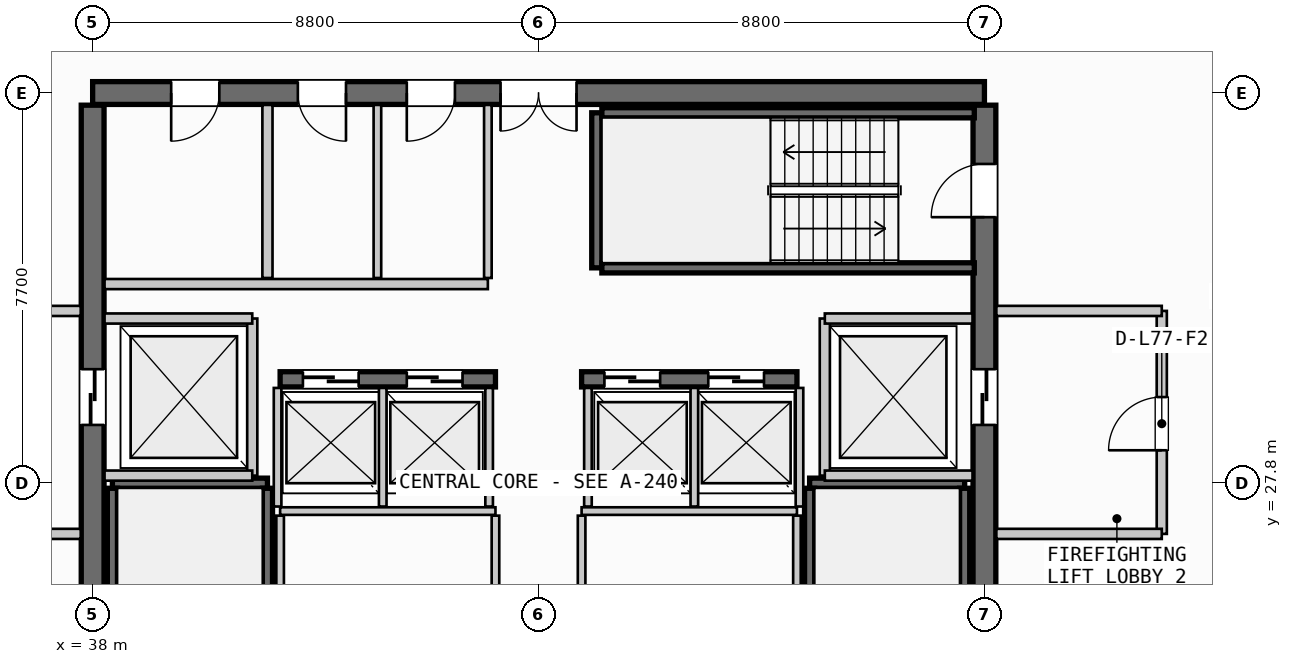
"""IFC4 building model, lengths in metres.
Left out: names, types, materials, properties, quantities, classifications, styles, units other than length and angle.
Written with IfcOpenShell. Run it as: python <this file> out.ifc"""

import sys

from ifc_helpers import new_model, si_unit, direction, frame, frame_2d, origin, place, context, subcontext, project, spatial, rectangle, extrude, source, transform, mapped, element, fill, save


model = new_model("IFC4")
c1 = context("Model", 3, precision=1e-05, world=origin(), true_north=direction((0.0, 1.0)))
c2 = subcontext(c1, "Body", "Model", "MODEL_VIEW")
j1 = project(units=[si_unit("LENGTHUNIT", "METRE"), si_unit("PLANEANGLEUNIT", "RADIAN")], contexts=[c1])
p1 = place(None, origin())
s1 = spatial("IfcSite", under=j1, at=p1, CompositionType="ELEMENT")
p2 = place(p1, origin())
s2 = spatial("IfcBuilding", under=s1, at=p2, CompositionType="ELEMENT")
p3 = place(p2, frame((0.0, 0.0, 290.5)))
s3 = spatial("IfcBuildingStorey", under=s2, at=p3, CompositionType="ELEMENT", Elevation=290.5)
p4 = place(p3, frame((55.6, 35.5, 0.0), z_axis=(0.0, 0.0, 1.0), x_axis=(-1.0, 0.0, 0.0)))
e1 = element("IfcWall", 1, at=p4, inside=s3, PredefinedType="SHEAR", context=c2, shape_type="SweptSolid", body=[
    extrude(rectangle(XDim=17.6, YDim=0.45, at=frame_2d((8.8, 0.0))), origin(), (0.0, 0.0, 1.0), 3.21),
])
p5 = place(p4, frame((8.05, 0.0, 0.0)))
e2 = element("IfcOpeningElement", 2, at=p5, cuts=e1, PredefinedType="OPENING", context=c2, shape_type="SweptSolid", body=[
    extrude(rectangle(XDim=1.5, YDim=2.2, at=frame_2d((0.75, 1.1))), frame((0.0, 0.235, 0.0), z_axis=(0.0, -1.0, 0.0), x_axis=(1.0, 0.0, 0.0)), (0.0, 0.0, 1.0), 0.47),
])
p6 = place(p4, frame((15.1, 0.0, 0.0)))
e3 = element("IfcOpeningElement", 3, at=p6, cuts=e1, PredefinedType="OPENING", context=c2, shape_type="SweptSolid", body=[
    extrude(rectangle(XDim=0.95, YDim=2.15, at=frame_2d((0.475, 1.075))), frame((0.0, 0.235, 0.0), z_axis=(0.0, -1.0, 0.0), x_axis=(1.0, 0.0, 0.0)), (0.0, 0.0, 1.0), 0.47),
])
p7 = place(p4, frame((12.6, 0.0, 0.0)))
e4 = element("IfcOpeningElement", 4, at=p7, cuts=e1, PredefinedType="OPENING", context=c2, shape_type="SweptSolid", body=[
    extrude(rectangle(XDim=0.95, YDim=2.15, at=frame_2d((0.475, 1.075))), frame((0.0, 0.235, 0.0), z_axis=(0.0, -1.0, 0.0), x_axis=(1.0, 0.0, 0.0)), (0.0, 0.0, 1.0), 0.47),
])
p8 = place(p4, frame((10.45, 0.0, 0.0)))
e5 = element("IfcOpeningElement", 5, at=p8, cuts=e1, PredefinedType="OPENING", context=c2, shape_type="SweptSolid", body=[
    extrude(rectangle(XDim=0.95, YDim=2.15, at=frame_2d((0.475, 1.075))), frame((0.0, 0.235, 0.0), z_axis=(0.0, -1.0, 0.0), x_axis=(1.0, 0.0, 0.0)), (0.0, 0.0, 1.0), 0.47),
])
p9 = place(p3, frame((38.0, 35.26, 0.0), z_axis=(0.0, 0.0, 1.0), x_axis=(0.0, -1.0, 0.0)))
e6 = element("IfcWall", 6, at=p9, inside=s3, PredefinedType="SHEAR", context=c2, shape_type="SweptSolid", body=[
    extrude(rectangle(XDim=14.92, YDim=0.45, at=frame_2d((7.46, 0.0))), origin(), (0.0, 0.0, 1.0), 3.21),
])
p10 = place(p9, frame((5.21, 0.0, 0.0)))
e7 = element("IfcOpeningElement", 7, at=p10, cuts=e6, PredefinedType="OPENING", context=c2, shape_type="SweptSolid", body=[
    extrude(rectangle(XDim=1.1, YDim=2.2, at=frame_2d((0.55, 1.1))), frame((0.0, 0.235, 0.0), z_axis=(0.0, -1.0, 0.0), x_axis=(1.0, 0.0, 0.0)), (0.0, 0.0, 1.0), 0.47),
])
p11 = place(p3, frame((55.6, 20.34, 0.0), z_axis=(0.0, 0.0, 1.0), x_axis=(0.0, 1.0, 0.0)))
e8 = element("IfcWall", 8, at=p11, inside=s3, PredefinedType="SHEAR", context=c2, shape_type="SweptSolid", body=[
    extrude(rectangle(XDim=14.92, YDim=0.45, at=frame_2d((7.46, 0.0))), origin(), (0.0, 0.0, 1.0), 3.21),
])
p12 = place(p11, frame((12.71, 0.0, 0.0)))
e9 = element("IfcOpeningElement", 9, at=p12, cuts=e8, PredefinedType="OPENING", context=c2, shape_type="SweptSolid", body=[
    extrude(rectangle(XDim=1.05, YDim=2.15, at=frame_2d((0.525, 1.075))), frame((0.0, 0.235, 0.0), z_axis=(0.0, -1.0, 0.0), x_axis=(1.0, 0.0, 0.0)), (0.0, 0.0, 1.0), 0.47),
])
p13 = place(p11, frame((8.61, 0.0, 0.0)))
e10 = element("IfcOpeningElement", 10, at=p13, cuts=e8, PredefinedType="OPENING", context=c2, shape_type="SweptSolid", body=[
    extrude(rectangle(XDim=1.1, YDim=2.2, at=frame_2d((0.55, 1.1))), frame((0.0, 0.235, 0.0), z_axis=(0.0, -1.0, 0.0), x_axis=(1.0, 0.0, 0.0)), (0.0, 0.0, 1.0), 0.47),
])
p14 = place(p3, frame((41.7, 29.85, 0.0), z_axis=(0.0, 0.0, 1.0), x_axis=(1.0, 0.0, 0.0)))
e11 = element("IfcWall", 11, at=p14, inside=s3, PredefinedType="SHEAR", context=c2, shape_type="SweptSolid", body=[
    extrude(rectangle(XDim=4.25, YDim=0.3, at=frame_2d((2.125, 0.0))), origin(), (0.0, 0.0, 1.0), 3.21),
])
p15 = place(p14, frame((0.45, 0.0, 0.0)))
e12 = element("IfcOpeningElement", 12, at=p15, cuts=e11, PredefinedType="OPENING", context=c2, shape_type="SweptSolid", body=[
    extrude(rectangle(XDim=1.1, YDim=2.2, at=frame_2d((0.55, 1.1))), frame((0.0, 0.16, 0.0), z_axis=(0.0, -1.0, 0.0), x_axis=(1.0, 0.0, 0.0)), (0.0, 0.0, 1.0), 0.32),
])
p16 = place(p14, frame((2.5, 0.0, 0.0)))
e13 = element("IfcOpeningElement", 13, at=p16, cuts=e11, PredefinedType="OPENING", context=c2, shape_type="SweptSolid", body=[
    extrude(rectangle(XDim=1.1, YDim=2.2, at=frame_2d((0.55, 1.1))), frame((0.0, 0.16, 0.0), z_axis=(0.0, -1.0, 0.0), x_axis=(1.0, 0.0, 0.0)), (0.0, 0.0, 1.0), 0.32),
])
p17 = place(p3, frame((47.65, 29.85, 0.0), z_axis=(0.0, 0.0, 1.0), x_axis=(1.0, 0.0, 0.0)))
e14 = element("IfcWall", 14, at=p17, inside=s3, PredefinedType="SHEAR", context=c2, shape_type="SweptSolid", body=[
    extrude(rectangle(XDim=4.25, YDim=0.3, at=frame_2d((2.125, 0.0))), origin(), (0.0, 0.0, 1.0), 3.21),
])
p18 = place(p17, frame((0.45, 0.0, 0.0)))
e15 = element("IfcOpeningElement", 15, at=p18, cuts=e14, PredefinedType="OPENING", context=c2, shape_type="SweptSolid", body=[
    extrude(rectangle(XDim=1.1, YDim=2.2, at=frame_2d((0.55, 1.1))), frame((0.0, 0.16, 0.0), z_axis=(0.0, -1.0, 0.0), x_axis=(1.0, 0.0, 0.0)), (0.0, 0.0, 1.0), 0.32),
])
p19 = place(p17, frame((2.5, 0.0, 0.0)))
e16 = element("IfcOpeningElement", 16, at=p19, cuts=e14, PredefinedType="OPENING", context=c2, shape_type="SweptSolid", body=[
    extrude(rectangle(XDim=1.1, YDim=2.2, at=frame_2d((0.55, 1.1))), frame((0.0, 0.16, 0.0), z_axis=(0.0, -1.0, 0.0), x_axis=(1.0, 0.0, 0.0)), (0.0, 0.0, 1.0), 0.32),
])
p20 = place(p3, frame((38.39, 27.8, 0.0), z_axis=(0.0, 0.0, 1.0), x_axis=(1.0, 0.0, 0.0)))
e17 = element("IfcWall", 17, at=p20, inside=s3, PredefinedType="SHEAR", context=c2, shape_type="SweptSolid", body=[
    extrude(rectangle(XDim=3.06, YDim=0.2, at=frame_2d((1.53, 0.0))), origin(), (0.0, 0.0, 1.0), 3.21),
])
for number, where, z_axis, x_axis in (
    (18, (41.45, 27.7, 0.0), (0.0, 0.0, 1.0), (0.0, -1.0, 0.0)),
    (19, (38.39, 20.35, 0.0), (0.0, 0.0, 1.0), (0.0, 1.0, 0.0)),
):
    element("IfcWall", number, at=place(p3, frame(where, z_axis=z_axis, x_axis=x_axis)), inside=s3, PredefinedType="SHEAR", context=c2, shape_type="SweptSolid", body=[
        extrude(rectangle(XDim=7.35, YDim=0.2, at=frame_2d((3.675, 0.0))), origin(), (0.0, 0.0, 1.0), 3.21),
    ])
p21 = place(p3, frame((52.15, 27.8, 0.0), z_axis=(0.0, 0.0, 1.0), x_axis=(1.0, 0.0, 0.0)))
e20 = element("IfcWall", 20, at=p21, inside=s3, PredefinedType="SHEAR", context=c2, shape_type="SweptSolid", body=[
    extrude(rectangle(XDim=3.06, YDim=0.2, at=frame_2d((1.53, 0.0))), origin(), (0.0, 0.0, 1.0), 3.21),
])
for number, where, z_axis, x_axis in (
    (21, (55.21, 27.7, 0.0), (0.0, 0.0, 1.0), (0.0, -1.0, 0.0)),
    (22, (52.15, 20.35, 0.0), (0.0, 0.0, 1.0), (0.0, 1.0, 0.0)),
):
    element("IfcWall", number, at=place(p3, frame(where, z_axis=z_axis, x_axis=x_axis)), inside=s3, PredefinedType="SHEAR", context=c2, shape_type="SweptSolid", body=[
        extrude(rectangle(XDim=7.35, YDim=0.2, at=frame_2d((3.675, 0.0))), origin(), (0.0, 0.0, 1.0), 3.21),
    ])
p22 = place(p3, frame((47.95, 32.05, 0.0), z_axis=(0.0, 0.0, 1.0), x_axis=(0.0, 1.0, 0.0)))
e23 = element("IfcWall", 23, at=p22, inside=s3, PredefinedType="SHEAR", context=c2, shape_type="SweptSolid", body=[
    extrude(rectangle(XDim=3.06, YDim=0.2, at=frame_2d((1.53, 0.0))), origin(), (0.0, 0.0, 1.0), 3.21),
])
for number, where, z_axis, x_axis in (
    (24, (48.05, 35.11, 0.0), (0.0, 0.0, 1.0), (1.0, 0.0, 0.0)),
    (25, (55.4, 32.05, 0.0), (0.0, 0.0, 1.0), (-1.0, 0.0, 0.0)),
):
    element("IfcWall", number, at=place(p3, frame(where, z_axis=z_axis, x_axis=x_axis)), inside=s3, PredefinedType="SHEAR", context=c2, shape_type="SweptSolid", body=[
        extrude(rectangle(XDim=7.35, YDim=0.2, at=frame_2d((3.675, 0.0))), origin(), (0.0, 0.0, 1.0), 3.21),
    ])
p23 = place(p3, frame((41.15, 27.95, 0.0), z_axis=(0.0, 0.0, 1.0), x_axis=(0.0, 1.0, 0.0)))
e26 = element("IfcWall", 26, at=p23, inside=s3, PredefinedType="PARTITIONING", context=c2, shape_type="SweptSolid", body=[
    extrude(rectangle(XDim=3.1, YDim=0.2, at=frame_2d((1.55, 0.0))), origin(), (0.0, 0.0, 1.0), 2.315),
])
for number, where, z_axis, x_axis in (
    (27, (38.235, 27.95, 0.0), (0.0, 0.0, 1.0), (1.0, 0.0, 0.0)),
    (28, (38.235, 31.05, 0.0), (0.0, 0.0, 1.0), (1.0, 0.0, 0.0)),
):
    element("IfcWall", number, at=place(p3, frame(where, z_axis=z_axis, x_axis=x_axis)), inside=s3, PredefinedType="PARTITIONING", context=c2, shape_type="SweptSolid", body=[
        extrude(rectangle(XDim=2.915, YDim=0.2, at=frame_2d((1.458, 0.0))), origin(), (0.0, 0.0, 1.0), 2.315),
    ])
for number, where, z_axis, x_axis in (
    (29, (34.5, 26.8, 0.0), (0.0, 0.0, 1.0), (1.0, 0.0, 0.0)),
    (30, (34.5, 31.2, 0.0), (0.0, 0.0, 1.0), (1.0, 0.0, 0.0)),
):
    element("IfcWall", number, at=place(p3, frame(where, z_axis=z_axis, x_axis=x_axis)), inside=s3, PredefinedType="PARTITIONING", context=c2, shape_type="SweptSolid", body=[
        extrude(rectangle(XDim=3.265, YDim=0.2, at=frame_2d((1.632, 0.0))), origin(), (0.0, 0.0, 1.0), 2.315),
    ])
p24 = place(p3, frame((52.45, 27.95, 0.0), z_axis=(0.0, 0.0, 1.0), x_axis=(0.0, 1.0, 0.0)))
e31 = element("IfcWall", 31, at=p24, inside=s3, PredefinedType="PARTITIONING", context=c2, shape_type="SweptSolid", body=[
    extrude(rectangle(XDim=3.1, YDim=0.2, at=frame_2d((1.55, 0.0))), origin(), (0.0, 0.0, 1.0), 2.315),
])
for number, where, z_axis, x_axis in (
    (32, (52.45, 27.95, 0.0), (0.0, 0.0, 1.0), (1.0, 0.0, 0.0)),
    (33, (52.45, 31.05, 0.0), (0.0, 0.0, 1.0), (1.0, 0.0, 0.0)),
):
    element("IfcWall", number, at=place(p3, frame(where, z_axis=z_axis, x_axis=x_axis)), inside=s3, PredefinedType="PARTITIONING", context=c2, shape_type="SweptSolid", body=[
        extrude(rectangle(XDim=2.915, YDim=0.2, at=frame_2d((1.458, 0.0))), origin(), (0.0, 0.0, 1.0), 2.315),
    ])
p25 = place(p3, frame((59.1, 26.8, 0.0), z_axis=(0.0, 0.0, 1.0), x_axis=(0.0, 1.0, 0.0)))
e34 = element("IfcWall", 34, at=p25, inside=s3, PredefinedType="PARTITIONING", context=c2, shape_type="SweptSolid", body=[
    extrude(rectangle(XDim=4.4, YDim=0.2, at=frame_2d((2.2, 0.0))), origin(), (0.0, 0.0, 1.0), 2.315),
])
p26 = place(p25, frame((1.65, 0.0, 0.0)))
e35 = element("IfcOpeningElement", 35, at=p26, cuts=e34, PredefinedType="OPENING", context=c2, shape_type="SweptSolid", body=[
    extrude(rectangle(XDim=1.05, YDim=2.15, at=frame_2d((0.525, 1.075))), frame((0.0, 0.11, 0.0), z_axis=(0.0, -1.0, 0.0), x_axis=(1.0, 0.0, 0.0)), (0.0, 0.0, 1.0), 0.22),
])
for number, where, z_axis, x_axis in (
    (36, (55.835, 26.8, 0.0), (0.0, 0.0, 1.0), (1.0, 0.0, 0.0)),
    (37, (55.835, 31.2, 0.0), (0.0, 0.0, 1.0), (1.0, 0.0, 0.0)),
):
    element("IfcWall", number, at=place(p3, frame(where, z_axis=z_axis, x_axis=x_axis)), inside=s3, PredefinedType="PARTITIONING", context=c2, shape_type="SweptSolid", body=[
        extrude(rectangle(XDim=3.265, YDim=0.2, at=frame_2d((1.633, 0.0))), origin(), (0.0, 0.0, 1.0), 2.315),
    ])
for number, where, z_axis, x_axis in (
    (38, (41.7, 27.25, 0.0), (0.0, 0.0, 1.0), (1.0, 0.0, 0.0)),
    (39, (47.65, 27.25, 0.0), (0.0, 0.0, 1.0), (1.0, 0.0, 0.0)),
):
    element("IfcWall", number, at=place(p3, frame(where, z_axis=z_axis, x_axis=x_axis)), inside=s3, PredefinedType="PARTITIONING", context=c2, shape_type="SweptSolid", body=[
        extrude(rectangle(XDim=4.25, YDim=0.15, at=frame_2d((2.125, 0.0))), origin(), (0.0, 0.0, 1.0), 2.315),
    ])
for number, where, z_axis, x_axis in (
    (40, (41.7, 24.92, 0.0), (0.0, 0.0, 1.0), (0.0, 1.0, 0.0)),
    (41, (45.95, 24.92, 0.0), (0.0, 0.0, 1.0), (0.0, 1.0, 0.0)),
    (42, (47.65, 24.92, 0.0), (0.0, 0.0, 1.0), (0.0, 1.0, 0.0)),
    (43, (51.9, 24.92, 0.0), (0.0, 0.0, 1.0), (0.0, 1.0, 0.0)),
):
    element("IfcWall", number, at=place(p3, frame(where, z_axis=z_axis, x_axis=x_axis)), inside=s3, PredefinedType="PARTITIONING", context=c2, shape_type="SweptSolid", body=[
        extrude(rectangle(XDim=2.24, YDim=0.15, at=frame_2d((1.12, 0.0))), origin(), (0.0, 0.0, 1.0), 2.315),
    ])
for number, where, z_axis, x_axis in (
    (44, (41.65, 27.34, 0.0), (0.0, 0.0, 1.0), (0.0, 1.0, 0.0)),
    (45, (43.725, 27.34, 0.0), (0.0, 0.0, 1.0), (0.0, 1.0, 0.0)),
    (46, (45.825, 27.34, 0.0), (0.0, 0.0, 1.0), (0.0, 1.0, 0.0)),
    (47, (47.775, 27.34, 0.0), (0.0, 0.0, 1.0), (0.0, 1.0, 0.0)),
    (48, (49.875, 27.34, 0.0), (0.0, 0.0, 1.0), (0.0, 1.0, 0.0)),
    (49, (51.95, 27.34, 0.0), (0.0, 0.0, 1.0), (0.0, 1.0, 0.0)),
):
    element("IfcWall", number, at=place(p3, frame(where, z_axis=z_axis, x_axis=x_axis)), inside=s3, PredefinedType="PARTITIONING", context=c2, shape_type="SweptSolid", body=[
        extrude(rectangle(XDim=2.34, YDim=0.15, at=frame_2d((1.17, 0.0))), origin(), (0.0, 0.0, 1.0), 2.315),
    ])
p27 = place(p3, frame((41.45, 31.85, 0.0), z_axis=(0.0, 0.0, 1.0), x_axis=(0.0, 1.0, 0.0)))
e50 = element("IfcWall", 50, at=p27, inside=s3, PredefinedType="PARTITIONING", context=c2, shape_type="SweptSolid", body=[
    extrude(rectangle(XDim=3.415, YDim=0.2, at=frame_2d((1.708, 0.0))), origin(), (0.0, 0.0, 1.0), 2.315),
])
p28 = place(p3, frame((38.235, 31.73, 0.0), z_axis=(0.0, 0.0, 1.0), x_axis=(1.0, 0.0, 0.0)))
e51 = element("IfcWall", 51, at=p28, inside=s3, PredefinedType="PARTITIONING", context=c2, shape_type="SweptSolid", body=[
    extrude(rectangle(XDim=7.565, YDim=0.2, at=frame_2d((3.782, 0.0))), origin(), (0.0, 0.0, 1.0), 2.315),
])
p29 = place(p3, frame((45.8, 31.85, 0.0), z_axis=(0.0, 0.0, 1.0), x_axis=(0.0, 1.0, 0.0)))
e52 = element("IfcWall", 52, at=p29, inside=s3, PredefinedType="PARTITIONING", context=c2, shape_type="SweptSolid", body=[
    extrude(rectangle(XDim=3.415, YDim=0.15, at=frame_2d((1.708, 0.0))), origin(), (0.0, 0.0, 1.0), 2.315),
])
p30 = place(p3, frame((43.62, 31.85, 0.0), z_axis=(0.0, 0.0, 1.0), x_axis=(0.0, 1.0, 0.0)))
e53 = element("IfcWall", 53, at=p30, inside=s3, PredefinedType="PLUMBINGWALL", context=c2, shape_type="SweptSolid", body=[
    extrude(rectangle(XDim=3.415, YDim=0.15, at=frame_2d((1.708, 0.0))), origin(), (0.0, 0.0, 1.0), 2.315),
])
m1 = source(origin(), c2, "Body", "SweptSolid", [
    extrude(rectangle(XDim=1.05, YDim=2.15, at=frame_2d((0.525, 1.075))), frame((0.0, 0.025, 0.0), z_axis=(0.0, -1.0, 0.0), x_axis=(1.0, 0.0, 0.0)), (0.0, 0.0, 1.0), 0.05),
])
p31 = place(p12, origin())
e54 = element("IfcDoor", 54, at=p31, inside=s3, OperationType="SINGLE_SWING_LEFT", PredefinedType="DOOR", context=c2, shape_type="MappedRepresentation", body=[
    mapped(m1, transform((0.0, 0.0, 0.0), scale=1.0)),
])
fill(e9, e54)
m2 = source(origin(), c2, "Body", "SweptSolid", [
    extrude(rectangle(XDim=1.5, YDim=2.2, at=frame_2d((0.75, 1.1))), frame((0.0, 0.025, 0.0), z_axis=(0.0, -1.0, 0.0), x_axis=(1.0, 0.0, 0.0)), (0.0, 0.0, 1.0), 0.05),
])
p32 = place(p5, origin())
e55 = element("IfcDoor", 55, at=p32, inside=s3, OperationType="DOUBLE_DOOR_SINGLE_SWING", PredefinedType="DOOR", context=c2, shape_type="MappedRepresentation", body=[
    mapped(m2, transform((0.0, 0.0, 0.0), scale=1.0)),
])
fill(e2, e55)
m3 = source(origin(), c2, "Body", "SweptSolid", [
    extrude(rectangle(XDim=1.1, YDim=2.2, at=frame_2d((0.55, 1.1))), frame((0.0, 0.025, 0.0), z_axis=(0.0, -1.0, 0.0), x_axis=(1.0, 0.0, 0.0)), (0.0, 0.0, 1.0), 0.05),
])
p33 = place(p10, origin())
e56 = element("IfcDoor", 56, at=p33, inside=s3, OperationType="SLIDING_TO_LEFT", PredefinedType="DOOR", context=c2, shape_type="MappedRepresentation", body=[
    mapped(m3, transform((0.0, 0.0, 0.0), scale=1.0)),
])
fill(e7, e56)
p34 = place(p13, origin())
e57 = element("IfcDoor", 57, at=p34, inside=s3, OperationType="SLIDING_TO_RIGHT", PredefinedType="DOOR", context=c2, shape_type="MappedRepresentation", body=[
    mapped(m3, transform((0.0, 0.0, 0.0), scale=1.0)),
])
fill(e10, e57)
p35 = place(p15, origin())
e58 = element("IfcDoor", 58, at=p35, inside=s3, OperationType="SLIDING_TO_LEFT", PredefinedType="DOOR", context=c2, shape_type="MappedRepresentation", body=[
    mapped(m3, transform((0.0, 0.0, 0.0), scale=1.0)),
])
fill(e12, e58)
p36 = place(p16, origin())
e59 = element("IfcDoor", 59, at=p36, inside=s3, OperationType="SLIDING_TO_LEFT", PredefinedType="DOOR", context=c2, shape_type="MappedRepresentation", body=[
    mapped(m3, transform((0.0, 0.0, 0.0), scale=1.0)),
])
fill(e13, e59)
p37 = place(p18, origin())
e60 = element("IfcDoor", 60, at=p37, inside=s3, OperationType="SLIDING_TO_LEFT", PredefinedType="DOOR", context=c2, shape_type="MappedRepresentation", body=[
    mapped(m3, transform((0.0, 0.0, 0.0), scale=1.0)),
])
fill(e15, e60)
p38 = place(p19, origin())
e61 = element("IfcDoor", 61, at=p38, inside=s3, OperationType="SLIDING_TO_LEFT", PredefinedType="DOOR", context=c2, shape_type="MappedRepresentation", body=[
    mapped(m3, transform((0.0, 0.0, 0.0), scale=1.0)),
])
fill(e16, e61)
m4 = source(origin(), c2, "Body", "SweptSolid", [
    extrude(rectangle(XDim=0.95, YDim=2.15, at=frame_2d((0.475, 1.075))), frame((0.0, 0.025, 0.0), z_axis=(0.0, -1.0, 0.0), x_axis=(1.0, 0.0, 0.0)), (0.0, 0.0, 1.0), 0.05),
])
p39 = place(p6, origin())
e62 = element("IfcDoor", 62, at=p39, inside=s3, OperationType="SINGLE_SWING_RIGHT", PredefinedType="DOOR", context=c2, shape_type="MappedRepresentation", body=[
    mapped(m4, transform((0.0, 0.0, 0.0), scale=1.0)),
])
fill(e3, e62)
p40 = place(p7, origin())
e63 = element("IfcDoor", 63, at=p40, inside=s3, OperationType="SINGLE_SWING_LEFT", PredefinedType="DOOR", context=c2, shape_type="MappedRepresentation", body=[
    mapped(m4, transform((0.0, 0.0, 0.0), scale=1.0)),
])
fill(e4, e63)
p41 = place(p8, origin())
e64 = element("IfcDoor", 64, at=p41, inside=s3, OperationType="SINGLE_SWING_RIGHT", PredefinedType="DOOR", context=c2, shape_type="MappedRepresentation", body=[
    mapped(m4, transform((0.0, 0.0, 0.0), scale=1.0)),
])
fill(e5, e64)
p42 = place(p26, origin())
e65 = element("IfcDoor", 65, at=p42, inside=s3, OperationType="SINGLE_SWING_LEFT", PredefinedType="DOOR", context=c2, shape_type="MappedRepresentation", body=[
    mapped(m1, transform((0.0, 0.0, 0.0), scale=1.0)),
])
fill(e35, e65)
save(model, sys.argv[1])
